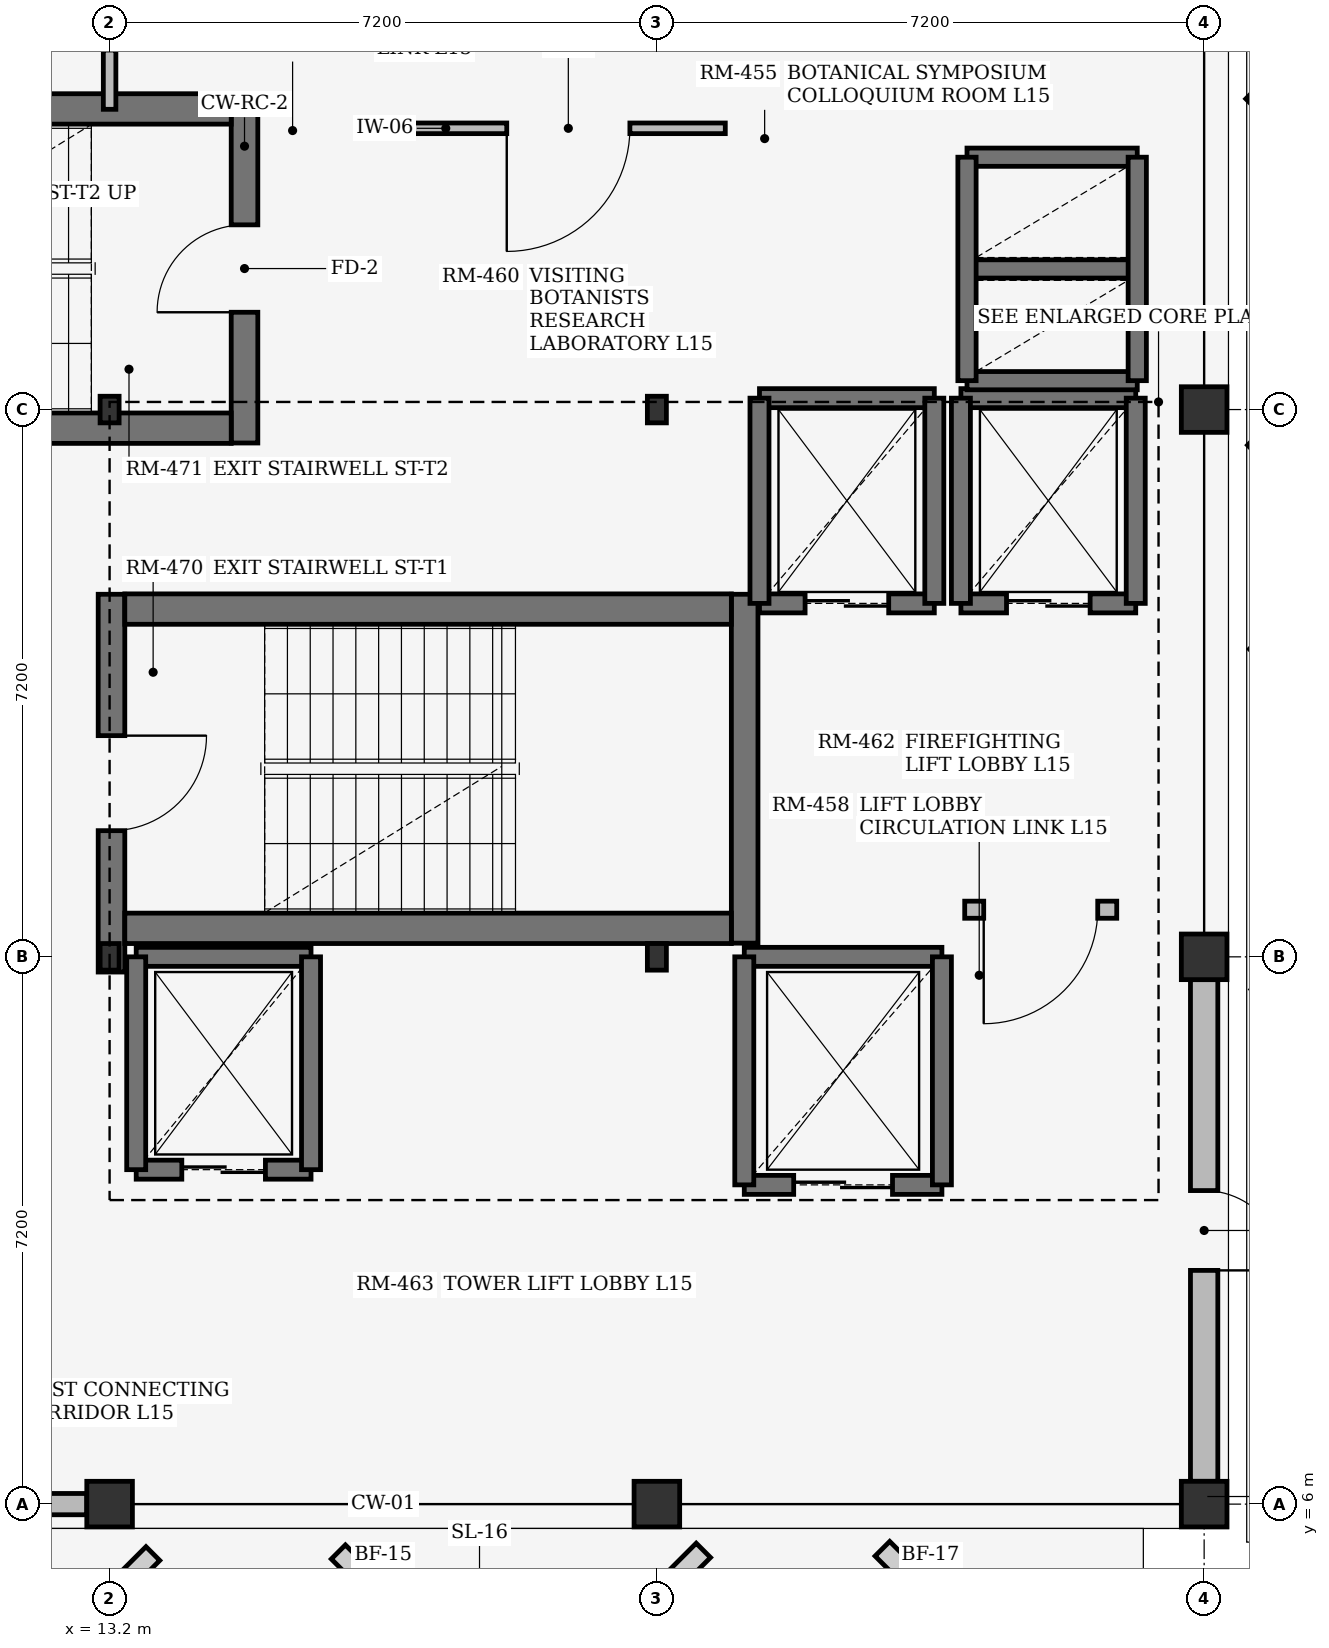
"""IFC4 building model, lengths in metres.
Left out: names, types, materials, properties, quantities, classifications, styles, units other than length and angle.
Written with IfcOpenShell. Run it as: python <this file> out.ifc"""

import sys

from ifc_helpers import new_model, si_unit, direction, frame, frame_2d, origin, origin_2d, place, context, subcontext, project, spatial, rectangle, i_section, extrude, element, fill, save


model = new_model("IFC4")
c1 = context("Model", 3, precision=1e-05, world=origin(), true_north=direction((0.0, 1.0)))
c2 = subcontext(c1, "Body", "Model", "MODEL_VIEW")
j1 = project(units=[si_unit("LENGTHUNIT", "METRE"), si_unit("PLANEANGLEUNIT", "RADIAN")], contexts=[c1])
p1 = place(None, origin())
s1 = spatial("IfcSite", under=j1, at=p1, CompositionType="ELEMENT")
p2 = place(p1, origin())
s2 = spatial("IfcBuilding", under=s1, at=p2, CompositionType="ELEMENT")
p3 = place(p2, frame((0.0, 0.0, 59.4)))
s3 = spatial("IfcBuildingStorey", under=s2, at=p3, CompositionType="ELEMENT", Elevation=59.4)
p4 = place(p3, frame((13.2, 6.0, 0.0), z_axis=(0.0, 0.0, 1.0), x_axis=(1.0, 0.0, 0.0)))
e1 = element("IfcColumn", 1, at=p4, inside=s3, PredefinedType="COLUMN", context=c2, shape_type="SweptSolid", body=[
    extrude(rectangle(XDim=0.6, YDim=0.6, at=origin_2d()), origin(), (0.0, 0.0, 1.0), 3.53),
])
for number, where, z_axis, x_axis in (
    (2, (13.2, 13.2, 0.0), (0.0, 0.0, 1.0), (1.0, 0.0, 0.0)),
    (3, (13.2, 20.4, 0.0), (0.0, 0.0, 1.0), (1.0, 0.0, 0.0)),
):
    element("IfcColumn", number, at=place(p3, frame(where, z_axis=z_axis, x_axis=x_axis)), inside=s3, PredefinedType="COLUMN", context=c2, shape_type="SweptSolid", body=[
        extrude(i_section(OverallWidth=0.25, OverallDepth=0.35, WebThickness=0.01, FlangeThickness=0.012, at=origin_2d()), origin(), (0.0, 0.0, 1.0), 3.53),
    ])
p5 = place(p3, frame((20.4, 6.0, 0.0), z_axis=(0.0, 0.0, 1.0), x_axis=(1.0, 0.0, 0.0)))
e4 = element("IfcColumn", 4, at=p5, inside=s3, PredefinedType="COLUMN", context=c2, shape_type="SweptSolid", body=[
    extrude(rectangle(XDim=0.6, YDim=0.6, at=origin_2d()), origin(), (0.0, 0.0, 1.0), 3.53),
])
for number, where, z_axis, x_axis in (
    (5, (20.4, 13.2, 0.0), (0.0, 0.0, 1.0), (1.0, 0.0, 0.0)),
    (6, (20.4, 20.4, 0.0), (0.0, 0.0, 1.0), (1.0, 0.0, 0.0)),
):
    element("IfcColumn", number, at=place(p3, frame(where, z_axis=z_axis, x_axis=x_axis)), inside=s3, PredefinedType="COLUMN", context=c2, shape_type="SweptSolid", body=[
        extrude(i_section(OverallWidth=0.25, OverallDepth=0.35, WebThickness=0.01, FlangeThickness=0.012, at=origin_2d()), origin(), (0.0, 0.0, 1.0), 3.53),
    ])
for number, where, z_axis, x_axis in (
    (7, (27.6, 6.0, 0.0), (0.0, 0.0, 1.0), (1.0, 0.0, 0.0)),
    (8, (27.6, 13.2, 0.0), (0.0, 0.0, 1.0), (1.0, 0.0, 0.0)),
    (9, (27.6, 20.4, 0.0), (0.0, 0.0, 1.0), (1.0, 0.0, 0.0)),
):
    element("IfcColumn", number, at=place(p3, frame(where, z_axis=z_axis, x_axis=x_axis)), inside=s3, PredefinedType="COLUMN", context=c2, shape_type="SweptSolid", body=[
        extrude(rectangle(XDim=0.6, YDim=0.6, at=origin_2d()), origin(), (0.0, 0.0, 1.0), 3.53),
    ])
p6 = place(p3, frame((6.3, 6.0, 0.0), z_axis=(0.0, 0.0, 1.0), x_axis=(1.0, 0.0, 0.0)))
e10 = element("IfcWall", 10, at=p6, inside=s3, PredefinedType="STANDARD", context=c2, shape_type="SweptSolid", body=[
    extrude(rectangle(XDim=6.6, YDim=0.28, at=frame_2d((3.3, 0.0))), origin(), (0.0, 0.0, 1.0), 3.11),
])
p7 = place(p6, frame((2.175, 0.0, 0.75)))
e11 = element("IfcOpeningElement", 11, at=p7, cuts=e10, PredefinedType="OPENING", context=c2, shape_type="SweptSolid", body=[
    extrude(rectangle(XDim=2.25, YDim=1.5, at=frame_2d((1.125, 0.75))), frame((0.0, 0.15, 0.0), z_axis=(0.0, -1.0, 0.0), x_axis=(1.0, 0.0, 0.0)), (0.0, 0.0, 1.0), 0.3),
])
p8 = place(p3, frame((27.6, 6.3, 0.0), z_axis=(0.0, 0.0, 1.0), x_axis=(0.0, 1.0, 0.0)))
e12 = element("IfcWall", 12, at=p8, inside=s3, PredefinedType="STANDARD", context=c2, shape_type="SweptSolid", body=[
    extrude(rectangle(XDim=6.6, YDim=0.36, at=frame_2d((3.3, 0.0))), origin(), (0.0, 0.0, 1.0), 3.11),
])
p9 = place(p8, frame((2.775, 0.0, 0.0)))
e13 = element("IfcOpeningElement", 13, at=p9, cuts=e12, PredefinedType="OPENING", context=c2, shape_type="SweptSolid", body=[
    extrude(rectangle(XDim=1.05, YDim=2.15, at=frame_2d((0.525, 1.075))), frame((0.0, 0.19, 0.0), z_axis=(0.0, -1.0, 0.0), x_axis=(1.0, 0.0, 0.0)), (0.0, 0.0, 1.0), 0.38),
])
p10 = place(p3, frame((13.225, 13.0, 0.0), z_axis=(0.0, 0.0, 1.0), x_axis=(0.0, 1.0, 0.0)))
e14 = element("IfcWall", 14, at=p10, inside=s3, PredefinedType="SHEAR", context=c2, shape_type="SweptSolid", body=[
    extrude(rectangle(XDim=4.97, YDim=0.35, at=frame_2d((2.485, 0.0))), origin(), (0.0, 0.0, 1.0), 3.53),
])
p11 = place(p10, frame((1.86, 0.0, 0.0)))
e15 = element("IfcOpeningElement", 15, at=p11, cuts=e14, PredefinedType="OPENING", context=c2, shape_type="SweptSolid", body=[
    extrude(rectangle(XDim=1.25, YDim=2.2, at=frame_2d((0.625, 1.1))), frame((0.0, 0.185, 0.0), z_axis=(0.0, -1.0, 0.0), x_axis=(1.0, 0.0, 0.0)), (0.0, 0.0, 1.0), 0.37),
])
p12 = place(p3, frame((21.555, 13.38, 0.0), z_axis=(0.0, 0.0, 1.0), x_axis=(0.0, 1.0, 0.0)))
e16 = element("IfcWall", 16, at=p12, inside=s3, PredefinedType="SHEAR", context=c2, shape_type="SweptSolid", body=[
    extrude(rectangle(XDim=4.59, YDim=0.35, at=frame_2d((2.295, 0.0))), origin(), (0.0, 0.0, 1.0), 3.53),
])
for number, where, z_axis, x_axis in (
    (17, (13.4, 13.575, 0.0), (0.0, 0.0, 1.0), (1.0, 0.0, 0.0)),
    (18, (13.4, 17.775, 0.0), (0.0, 0.0, 1.0), (1.0, 0.0, 0.0)),
):
    element("IfcWall", number, at=place(p3, frame(where, z_axis=z_axis, x_axis=x_axis)), inside=s3, PredefinedType="SHEAR", context=c2, shape_type="SweptSolid", body=[
        extrude(rectangle(XDim=7.98, YDim=0.4, at=frame_2d((3.99, 0.0))), origin(), (0.0, 0.0, 1.0), 3.53),
    ])
p13 = place(p3, frame((14.975, 24.55, 0.0), z_axis=(0.0, 0.0, 1.0), x_axis=(0.0, -1.0, 0.0)))
e19 = element("IfcWall", 19, at=p13, inside=s3, PredefinedType="SHEAR", context=c2, shape_type="SweptSolid", body=[
    extrude(rectangle(XDim=4.59, YDim=0.35, at=frame_2d((2.295, 0.0))), origin(), (0.0, 0.0, 1.0), 3.53),
])
p14 = place(p13, frame((1.72, 0.0, 0.0)))
e20 = element("IfcOpeningElement", 20, at=p14, cuts=e19, PredefinedType="OPENING", context=c2, shape_type="SweptSolid", body=[
    extrude(rectangle(XDim=1.15, YDim=2.2, at=frame_2d((0.575, 1.1))), frame((0.0, 0.185, 0.0), z_axis=(0.0, -1.0, 0.0), x_axis=(1.0, 0.0, 0.0)), (0.0, 0.0, 1.0), 0.37),
])
for number, where, z_axis, x_axis in (
    (21, (14.8, 24.355, 0.0), (0.0, 0.0, 1.0), (-1.0, 0.0, 0.0)),
    (22, (14.8, 20.155, 0.0), (0.0, 0.0, 1.0), (-1.0, 0.0, 0.0)),
):
    element("IfcWall", number, at=place(p3, frame(where, z_axis=z_axis, x_axis=x_axis)), inside=s3, PredefinedType="SHEAR", context=c2, shape_type="SweptSolid", body=[
        extrude(rectangle(XDim=7.98, YDim=0.4, at=frame_2d((3.99, 0.0))), origin(), (0.0, 0.0, 1.0), 3.53),
    ])
p15 = place(p3, frame((21.75, 17.85, 0.0), z_axis=(0.0, 0.0, 1.0), x_axis=(1.0, 0.0, 0.0)))
e23 = element("IfcWall", 23, at=p15, inside=s3, PredefinedType="SHEAR", context=c2, shape_type="SweptSolid", body=[
    extrude(rectangle(XDim=2.3, YDim=0.25, at=frame_2d((1.15, 0.0))), origin(), (0.0, 0.0, 1.0), 3.53),
])
p16 = place(p15, frame((0.6, 0.0, 0.0)))
e24 = element("IfcOpeningElement", 24, at=p16, cuts=e23, PredefinedType="OPENING", context=c2, shape_type="SweptSolid", body=[
    extrude(rectangle(XDim=1.1, YDim=2.2, at=frame_2d((0.55, 1.1))), frame((0.0, 0.135, 0.0), z_axis=(0.0, -1.0, 0.0), x_axis=(1.0, 0.0, 0.0)), (0.0, 0.0, 1.0), 0.27),
])
p17 = place(p3, frame((21.75, 20.55, 0.0), z_axis=(0.0, 0.0, 1.0), x_axis=(1.0, 0.0, 0.0)))
e25 = element("IfcWall", 25, at=p17, inside=s3, PredefinedType="SHEAR", context=c2, shape_type="SweptSolid", body=[
    extrude(rectangle(XDim=2.3, YDim=0.25, at=frame_2d((1.15, 0.0))), origin(), (0.0, 0.0, 1.0), 3.53),
])
for number, where, z_axis, x_axis in (
    (26, (21.75, 17.85, 0.0), (0.0, 0.0, 1.0), (0.0, 1.0, 0.0)),
    (27, (24.05, 17.85, 0.0), (0.0, 0.0, 1.0), (0.0, 1.0, 0.0)),
):
    element("IfcWall", number, at=place(p3, frame(where, z_axis=z_axis, x_axis=x_axis)), inside=s3, PredefinedType="SHEAR", context=c2, shape_type="SweptSolid", body=[
        extrude(rectangle(XDim=2.7, YDim=0.25, at=frame_2d((1.35, 0.0))), origin(), (0.0, 0.0, 1.0), 3.53),
    ])
p18 = place(p3, frame((24.4, 17.85, 0.0), z_axis=(0.0, 0.0, 1.0), x_axis=(1.0, 0.0, 0.0)))
e28 = element("IfcWall", 28, at=p18, inside=s3, PredefinedType="SHEAR", context=c2, shape_type="SweptSolid", body=[
    extrude(rectangle(XDim=2.3, YDim=0.25, at=frame_2d((1.15, 0.0))), origin(), (0.0, 0.0, 1.0), 3.53),
])
p19 = place(p18, frame((0.6, 0.0, 0.0)))
e29 = element("IfcOpeningElement", 29, at=p19, cuts=e28, PredefinedType="OPENING", context=c2, shape_type="SweptSolid", body=[
    extrude(rectangle(XDim=1.1, YDim=2.2, at=frame_2d((0.55, 1.1))), frame((0.0, 0.135, 0.0), z_axis=(0.0, -1.0, 0.0), x_axis=(1.0, 0.0, 0.0)), (0.0, 0.0, 1.0), 0.27),
])
p20 = place(p3, frame((24.4, 20.55, 0.0), z_axis=(0.0, 0.0, 1.0), x_axis=(1.0, 0.0, 0.0)))
e30 = element("IfcWall", 30, at=p20, inside=s3, PredefinedType="SHEAR", context=c2, shape_type="SweptSolid", body=[
    extrude(rectangle(XDim=2.3, YDim=0.25, at=frame_2d((1.15, 0.0))), origin(), (0.0, 0.0, 1.0), 3.53),
])
for number, where, z_axis, x_axis in (
    (31, (24.4, 17.85, 0.0), (0.0, 0.0, 1.0), (0.0, 1.0, 0.0)),
    (32, (26.7, 17.85, 0.0), (0.0, 0.0, 1.0), (0.0, 1.0, 0.0)),
):
    element("IfcWall", number, at=place(p3, frame(where, z_axis=z_axis, x_axis=x_axis)), inside=s3, PredefinedType="SHEAR", context=c2, shape_type="SweptSolid", body=[
        extrude(rectangle(XDim=2.7, YDim=0.25, at=frame_2d((1.35, 0.0))), origin(), (0.0, 0.0, 1.0), 3.53),
    ])
p21 = place(p3, frame((13.55, 10.4, 0.0), z_axis=(0.0, 0.0, 1.0), x_axis=(1.0, 0.0, 0.0)))
e33 = element("IfcWall", 33, at=p21, inside=s3, PredefinedType="SHEAR", context=c2, shape_type="SweptSolid", body=[
    extrude(rectangle(XDim=2.3, YDim=0.25, at=frame_2d((1.15, 0.0))), origin(), (0.0, 0.0, 1.0), 3.53),
])
p22 = place(p21, frame((0.6, 0.0, 0.0)))
e34 = element("IfcOpeningElement", 34, at=p22, cuts=e33, PredefinedType="OPENING", context=c2, shape_type="SweptSolid", body=[
    extrude(rectangle(XDim=1.1, YDim=2.2, at=frame_2d((0.55, 1.1))), frame((0.0, 0.135, 0.0), z_axis=(0.0, -1.0, 0.0), x_axis=(1.0, 0.0, 0.0)), (0.0, 0.0, 1.0), 0.27),
])
p23 = place(p3, frame((13.55, 13.2, 0.0), z_axis=(0.0, 0.0, 1.0), x_axis=(1.0, 0.0, 0.0)))
e35 = element("IfcWall", 35, at=p23, inside=s3, PredefinedType="SHEAR", context=c2, shape_type="SweptSolid", body=[
    extrude(rectangle(XDim=2.3, YDim=0.25, at=frame_2d((1.15, 0.0))), origin(), (0.0, 0.0, 1.0), 3.53),
])
for number, where, z_axis, x_axis in (
    (36, (13.55, 10.4, 0.0), (0.0, 0.0, 1.0), (0.0, 1.0, 0.0)),
    (37, (15.85, 10.4, 0.0), (0.0, 0.0, 1.0), (0.0, 1.0, 0.0)),
):
    element("IfcWall", number, at=place(p3, frame(where, z_axis=z_axis, x_axis=x_axis)), inside=s3, PredefinedType="SHEAR", context=c2, shape_type="SweptSolid", body=[
        extrude(rectangle(XDim=2.8, YDim=0.25, at=frame_2d((1.4, 0.0))), origin(), (0.0, 0.0, 1.0), 3.53),
    ])
p24 = place(p3, frame((21.55, 10.2, 0.0), z_axis=(0.0, 0.0, 1.0), x_axis=(1.0, 0.0, 0.0)))
e38 = element("IfcWall", 38, at=p24, inside=s3, PredefinedType="SHEAR", context=c2, shape_type="SweptSolid", body=[
    extrude(rectangle(XDim=2.6, YDim=0.25, at=frame_2d((1.3, 0.0))), origin(), (0.0, 0.0, 1.0), 3.53),
])
p25 = place(p24, frame((0.65, 0.0, 0.0)))
e39 = element("IfcOpeningElement", 39, at=p25, cuts=e38, PredefinedType="OPENING", context=c2, shape_type="SweptSolid", body=[
    extrude(rectangle(XDim=1.3, YDim=2.25, at=frame_2d((0.65, 1.125))), frame((0.0, 0.135, 0.0), z_axis=(0.0, -1.0, 0.0), x_axis=(1.0, 0.0, 0.0)), (0.0, 0.0, 1.0), 0.27),
])
p26 = place(p3, frame((21.55, 13.2, 0.0), z_axis=(0.0, 0.0, 1.0), x_axis=(1.0, 0.0, 0.0)))
e40 = element("IfcWall", 40, at=p26, inside=s3, PredefinedType="SHEAR", context=c2, shape_type="SweptSolid", body=[
    extrude(rectangle(XDim=2.6, YDim=0.25, at=frame_2d((1.3, 0.0))), origin(), (0.0, 0.0, 1.0), 3.53),
])
for number, where, z_axis, x_axis in (
    (41, (21.55, 10.2, 0.0), (0.0, 0.0, 1.0), (0.0, 1.0, 0.0)),
    (42, (24.15, 10.2, 0.0), (0.0, 0.0, 1.0), (0.0, 1.0, 0.0)),
):
    element("IfcWall", number, at=place(p3, frame(where, z_axis=z_axis, x_axis=x_axis)), inside=s3, PredefinedType="SHEAR", context=c2, shape_type="SweptSolid", body=[
        extrude(rectangle(XDim=3.0, YDim=0.25, at=frame_2d((1.5, 0.0))), origin(), (0.0, 0.0, 1.0), 3.53),
    ])
for number, where, z_axis, x_axis in (
    (43, (24.48, 20.78, 0.0), (0.0, 0.0, 1.0), (1.0, 0.0, 0.0)),
    (44, (24.48, 22.25, 0.0), (0.0, 0.0, 1.0), (1.0, 0.0, 0.0)),
    (45, (24.48, 23.72, 0.0), (0.0, 0.0, 1.0), (1.0, 0.0, 0.0)),
):
    element("IfcWall", number, at=place(p3, frame(where, z_axis=z_axis, x_axis=x_axis)), inside=s3, PredefinedType="SHEAR", context=c2, shape_type="SweptSolid", body=[
        extrude(rectangle(XDim=2.24, YDim=0.24, at=frame_2d((1.12, 0.0))), origin(), (0.0, 0.0, 1.0), 3.53),
    ])
for number, where, z_axis, x_axis in (
    (46, (24.48, 20.78, 0.0), (0.0, 0.0, 1.0), (0.0, 1.0, 0.0)),
    (47, (26.72, 20.78, 0.0), (0.0, 0.0, 1.0), (0.0, 1.0, 0.0)),
):
    element("IfcWall", number, at=place(p3, frame(where, z_axis=z_axis, x_axis=x_axis)), inside=s3, PredefinedType="SHEAR", context=c2, shape_type="SweptSolid", body=[
        extrude(rectangle(XDim=2.94, YDim=0.24, at=frame_2d((1.47, 0.0))), origin(), (0.0, 0.0, 1.0), 3.53),
    ])
p27 = place(p3, frame((24.45, 13.82, 0.0), z_axis=(0.0, 0.0, 1.0), x_axis=(1.0, 0.0, 0.0)))
e48 = element("IfcWall", 48, at=p27, inside=s3, PredefinedType="SOLIDWALL", context=c2, shape_type="SweptSolid", body=[
    extrude(rectangle(XDim=2.0, YDim=0.225, at=frame_2d((1.0, 0.0))), origin(), (0.0, 0.0, 1.0), 3.51),
])
p28 = place(p27, frame((0.25, 0.0, 0.0)))
e49 = element("IfcOpeningElement", 49, at=p28, cuts=e48, PredefinedType="OPENING", context=c2, shape_type="SweptSolid", body=[
    extrude(rectangle(XDim=1.5, YDim=2.2, at=frame_2d((0.75, 1.1))), frame((0.0, 0.123, 0.0), z_axis=(0.0, -1.0, 0.0), x_axis=(1.0, 0.0, 0.0)), (0.0, 0.0, 1.0), 0.245),
])
p29 = place(p3, frame((13.2, 24.35, 0.0), z_axis=(0.0, 0.0, 1.0), x_axis=(0.0, 1.0, 0.0)))
e50 = element("IfcWall", 50, at=p29, inside=s3, PredefinedType="PARTITIONING", context=c2, shape_type="SweptSolid", body=[
    extrude(rectangle(XDim=3.0, YDim=0.165, at=frame_2d((1.5, 0.0))), origin(), (0.0, 0.0, 1.0), 3.12),
])
p30 = place(p29, frame((0.78, 0.0, 0.0)))
e51 = element("IfcOpeningElement", 51, at=p30, cuts=e50, PredefinedType="OPENING", context=c2, shape_type="SweptSolid", body=[
    extrude(rectangle(XDim=1.44, YDim=2.24, at=frame_2d((0.72, 1.12))), frame((0.0, 0.093, 0.0), z_axis=(0.0, -1.0, 0.0), x_axis=(1.0, 0.0, 0.0)), (0.0, 0.0, 1.0), 0.185),
])
p31 = place(p3, frame((17.17, 24.1, 0.0), z_axis=(0.0, 0.0, 1.0), x_axis=(1.0, 0.0, 0.0)))
e52 = element("IfcWall", 52, at=p31, inside=s3, PredefinedType="PARTITIONING", context=c2, shape_type="SweptSolid", body=[
    extrude(rectangle(XDim=4.13, YDim=0.14, at=frame_2d((2.065, 0.0))), origin(), (0.0, 0.0, 1.0), 3.51),
])
p32 = place(p31, frame((1.255, 0.0, 0.0)))
e53 = element("IfcOpeningElement", 53, at=p32, cuts=e52, PredefinedType="OPENING", context=c2, shape_type="SweptSolid", body=[
    extrude(rectangle(XDim=1.62, YDim=2.28, at=frame_2d((0.81, 1.14))), frame((0.0, 0.08, 0.0), z_axis=(0.0, -1.0, 0.0), x_axis=(1.0, 0.0, 0.0)), (0.0, 0.0, 1.0), 0.16),
])
p33 = place(p9, frame((1.05, 0.0, 0.0), z_axis=(0.0, 0.0, 1.0), x_axis=(-1.0, 0.0, 0.0)))
e54 = element("IfcDoor", 54, at=p33, inside=s3, OperationType="SINGLE_SWING_LEFT", PredefinedType="DOOR", context=c2, shape_type="SweptSolid", body=[
    extrude(rectangle(XDim=1.05, YDim=2.15, at=frame_2d((0.525, 1.075))), frame((0.0, 0.025, 0.0), z_axis=(0.0, -1.0, 0.0), x_axis=(1.0, 0.0, 0.0)), (0.0, 0.0, 1.0), 0.05),
])
fill(e13, e54)
p34 = place(p11, origin())
e55 = element("IfcDoor", 55, at=p34, inside=s3, OperationType="SINGLE_SWING_RIGHT", PredefinedType="DOOR", context=c2, shape_type="SweptSolid", body=[
    extrude(rectangle(XDim=1.25, YDim=2.2, at=frame_2d((0.625, 1.1))), frame((0.0, 0.025, 0.0), z_axis=(0.0, -1.0, 0.0), x_axis=(1.0, 0.0, 0.0)), (0.0, 0.0, 1.0), 0.05),
])
fill(e15, e55)
p35 = place(p14, origin())
e56 = element("IfcDoor", 56, at=p35, inside=s3, OperationType="SINGLE_SWING_RIGHT", PredefinedType="DOOR", context=c2, shape_type="SweptSolid", body=[
    extrude(rectangle(XDim=1.15, YDim=2.2, at=frame_2d((0.575, 1.1))), frame((0.0, 0.025, 0.0), z_axis=(0.0, -1.0, 0.0), x_axis=(1.0, 0.0, 0.0)), (0.0, 0.0, 1.0), 0.05),
])
fill(e20, e56)
p36 = place(p16, origin())
e57 = element("IfcDoor", 57, at=p36, inside=s3, OperationType="DOUBLE_DOOR_SLIDING", PredefinedType="DOOR", context=c2, shape_type="SweptSolid", body=[
    extrude(rectangle(XDim=1.1, YDim=2.2, at=frame_2d((0.55, 1.1))), frame((0.0, 0.025, 0.0), z_axis=(0.0, -1.0, 0.0), x_axis=(1.0, 0.0, 0.0)), (0.0, 0.0, 1.0), 0.05),
])
fill(e24, e57)
p37 = place(p19, origin())
e58 = element("IfcDoor", 58, at=p37, inside=s3, OperationType="DOUBLE_DOOR_SLIDING", PredefinedType="DOOR", context=c2, shape_type="SweptSolid", body=[
    extrude(rectangle(XDim=1.1, YDim=2.2, at=frame_2d((0.55, 1.1))), frame((0.0, 0.025, 0.0), z_axis=(0.0, -1.0, 0.0), x_axis=(1.0, 0.0, 0.0)), (0.0, 0.0, 1.0), 0.05),
])
fill(e29, e58)
p38 = place(p22, origin())
e59 = element("IfcDoor", 59, at=p38, inside=s3, OperationType="DOUBLE_DOOR_SLIDING", PredefinedType="DOOR", context=c2, shape_type="SweptSolid", body=[
    extrude(rectangle(XDim=1.1, YDim=2.2, at=frame_2d((0.55, 1.1))), frame((0.0, 0.025, 0.0), z_axis=(0.0, -1.0, 0.0), x_axis=(1.0, 0.0, 0.0)), (0.0, 0.0, 1.0), 0.05),
])
fill(e34, e59)
p39 = place(p25, origin())
e60 = element("IfcDoor", 60, at=p39, inside=s3, OperationType="DOUBLE_DOOR_SLIDING", PredefinedType="DOOR", context=c2, shape_type="SweptSolid", body=[
    extrude(rectangle(XDim=1.3, YDim=2.25, at=frame_2d((0.65, 1.125))), frame((0.0, 0.025, 0.0), z_axis=(0.0, -1.0, 0.0), x_axis=(1.0, 0.0, 0.0)), (0.0, 0.0, 1.0), 0.05),
])
fill(e39, e60)
p40 = place(p28, frame((1.5, 0.0, 0.0), z_axis=(0.0, 0.0, 1.0), x_axis=(-1.0, 0.0, 0.0)))
e61 = element("IfcDoor", 61, at=p40, inside=s3, OperationType="SINGLE_SWING_LEFT", PredefinedType="DOOR", context=c2, shape_type="SweptSolid", body=[
    extrude(rectangle(XDim=1.5, YDim=2.2, at=frame_2d((0.75, 1.1))), frame((0.0, 0.025, 0.0), z_axis=(0.0, -1.0, 0.0), x_axis=(1.0, 0.0, 0.0)), (0.0, 0.0, 1.0), 0.05),
])
fill(e49, e61)
p41 = place(p32, frame((1.62, 0.0, 0.0), z_axis=(0.0, 0.0, 1.0), x_axis=(-1.0, 0.0, 0.0)))
e62 = element("IfcDoor", 62, at=p41, inside=s3, OperationType="DOUBLE_DOOR_SINGLE_SWING", PredefinedType="DOOR", context=c2, shape_type="SweptSolid", body=[
    extrude(rectangle(XDim=1.62, YDim=2.28, at=frame_2d((0.81, 1.14))), frame((0.0, 0.025, 0.0), z_axis=(0.0, -1.0, 0.0), x_axis=(1.0, 0.0, 0.0)), (0.0, 0.0, 1.0), 0.05),
])
fill(e53, e62)
save(model, sys.argv[1])
